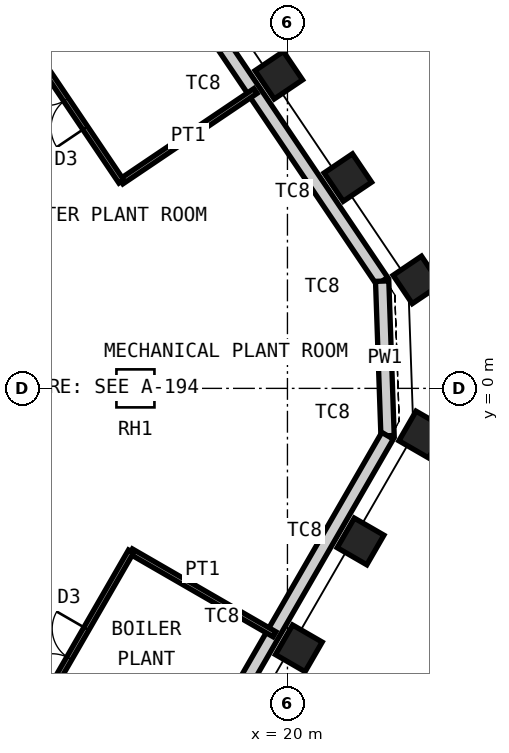
"""IFC4 building model, lengths in metres.
Left out: names, types, materials, properties, quantities, classifications, styles, units other than length and angle.
Written with IfcOpenShell. Run it as: python <this file> out.ifc"""

import sys

from ifc_helpers import new_model, si_unit, direction, frame, frame_2d, origin, origin_2d, place, context, subcontext, project, spatial, rectangle, hollow_rectangle, extrude, element, fill, save


model = new_model("IFC4")
c1 = context("Model", 3, precision=1e-05, world=origin(), true_north=direction((0.0, 1.0)))
c2 = subcontext(c1, "Body", "Model", "MODEL_VIEW")
j1 = project(units=[si_unit("LENGTHUNIT", "METRE"), si_unit("PLANEANGLEUNIT", "RADIAN")], contexts=[c1])
p1 = place(None, origin())
s1 = spatial("IfcSite", under=j1, at=p1, CompositionType="ELEMENT")
p2 = place(p1, origin())
s2 = spatial("IfcBuilding", under=s1, at=p2, CompositionType="ELEMENT")
p3 = place(p2, frame((0.0, 0.0, 343.6)))
s3 = spatial("IfcBuildingStorey", under=s2, at=p3, CompositionType="ELEMENT", Elevation=343.6)
for number, where, z_axis, x_axis in (
    (1, (19.773, 8.239, 0.0), (0.0, 0.0, 1.0), (-0.559, 0.829, 0.0)),
    (2, (21.589, 5.547, 0.0), (0.0, 0.0, 1.0), (-0.559, 0.829, 0.0)),
    (3, (23.406, 2.854, 0.0), (0.0, 0.0, 1.0), (-0.559, 0.829, 0.0)),
    (4, (23.548, -1.214, 0.0), (0.0, 0.0, 1.0), (0.5, 0.866, 0.0)),
    (5, (21.924, -4.027, 0.0), (0.0, 0.0, 1.0), (0.5, 0.866, 0.0)),
    (6, (20.3, -6.84, 0.0), (0.0, 0.0, 1.0), (0.5, 0.866, 0.0)),
):
    element("IfcColumn", number, at=place(p3, frame(where, z_axis=z_axis, x_axis=x_axis)), inside=s3, PredefinedType="COLUMN", context=c2, shape_type="SweptSolid", body=[
        extrude(hollow_rectangle(XDim=0.9, YDim=0.9, WallThickness=0.05, at=origin_2d()), origin(), (0.0, 0.0, 1.0), 4.65),
    ])
p4 = place(p3, frame((12.096, 18.235, 5.0), z_axis=(0.0, 0.0, 1.0), x_axis=(0.559186168722, -0.829042115161, 0.0)))
e7 = element("IfcWall", 7, at=p4, inside=s3, PredefinedType="PARAPET", context=c2, shape_type="SweptSolid", body=[
    extrude(rectangle(XDim=18.592, YDim=0.35, at=frame_2d((9.296, 0.0))), origin(), (0.0, 0.0, 1.0), 1.2),
])
p5 = place(p3, frame((22.492, 2.822, 5.0), z_axis=(0.0, 0.0, 1.0), x_axis=(0.03490639867, -0.999390585973, 0.0)))
e8 = element("IfcWall", 8, at=p5, inside=s3, PredefinedType="PARAPET", context=c2, shape_type="SweptSolid", body=[
    extrude(rectangle(XDim=4.071, YDim=0.35, at=frame_2d((2.035, 0.0))), origin(), (0.0, 0.0, 1.0), 1.2),
])
p6 = place(p3, frame((22.634, -1.246, 5.0), z_axis=(0.0, 0.0, 1.0), x_axis=(-0.499997535337, -0.866026826754, 0.0)))
e9 = element("IfcWall", 9, at=p6, inside=s3, PredefinedType="PARAPET", context=c2, shape_type="SweptSolid", body=[
    extrude(rectangle(XDim=18.592, YDim=0.35, at=frame_2d((9.296, 0.0))), origin(), (0.0, 0.0, 1.0), 1.2),
])
p7 = place(p3, frame((19.16, 7.826, 0.0), z_axis=(0.0, 0.0, 1.0), x_axis=(-0.829022699791, -0.559214952617, 0.0)))
e10 = element("IfcWall", 10, at=p7, inside=s3, PredefinedType="PARTITIONING", context=c2, shape_type="SweptSolid", body=[
    extrude(rectangle(XDim=4.26, YDim=0.15, at=frame_2d((2.13, 0.0))), origin(), (0.0, 0.0, 1.0), 4.65),
])
p8 = place(p3, frame((11.995, 10.829, 0.0), z_axis=(0.0, 0.0, 1.0), x_axis=(0.559193332958, -0.829037282862, 0.0)))
e11 = element("IfcWall", 11, at=p8, inside=s3, PredefinedType="PARTITIONING", context=c2, shape_type="SweptSolid", body=[
    extrude(rectangle(XDim=6.496, YDim=0.15, at=frame_2d((3.248, 0.0))), origin(), (0.0, 0.0, 1.0), 4.65),
])
p9 = place(p8, frame((2.998, 0.0, 0.0)))
e12 = element("IfcOpeningElement", 12, at=p9, cuts=e11, PredefinedType="OPENING", context=c2, shape_type="SweptSolid", body=[
    extrude(rectangle(XDim=1.8, YDim=2.4, at=frame_2d((0.9, 1.2))), frame((0.0, 0.085, 0.0), z_axis=(0.0, -1.0, 0.0), x_axis=(1.0, 0.0, 0.0)), (0.0, 0.0, 1.0), 0.17),
])
p10 = place(p3, frame((19.659, -6.47, 0.0), z_axis=(0.0, 0.0, 1.0), x_axis=(-0.866032659912, 0.499987431809, 0.0)))
e13 = element("IfcWall", 13, at=p10, inside=s3, PredefinedType="PARTITIONING", context=c2, shape_type="SweptSolid", body=[
    extrude(rectangle(XDim=4.36, YDim=0.15, at=frame_2d((2.18, 0.0))), origin(), (0.0, 0.0, 1.0), 4.65),
])
p11 = place(p3, frame((15.883, -4.29, 0.0), z_axis=(0.0, 0.0, 1.0), x_axis=(-0.500003318956, -0.866023487576, 0.0)))
e14 = element("IfcWall", 14, at=p11, inside=s3, PredefinedType="PARTITIONING", context=c2, shape_type="SweptSolid", body=[
    extrude(rectangle(XDim=6.496, YDim=0.15, at=frame_2d((3.248, 0.0))), origin(), (0.0, 0.0, 1.0), 4.65),
])
p12 = place(p11, frame((2.348, 0.0, 0.0)))
e15 = element("IfcOpeningElement", 15, at=p12, cuts=e14, PredefinedType="OPENING", context=c2, shape_type="SweptSolid", body=[
    extrude(rectangle(XDim=1.8, YDim=2.4, at=frame_2d((0.9, 1.2))), frame((0.0, 0.085, 0.0), z_axis=(0.0, -1.0, 0.0), x_axis=(1.0, 0.0, 0.0)), (0.0, 0.0, 1.0), 0.17),
])
p13 = place(p2, frame((0.0, 0.0, 348.6)))
p14 = place(p13, frame((0.0, 0.0, -0.35)))
p15 = place(p14, frame((16.0, 0.0, 0.0)))
p16 = place(p15, frame((0.0, 0.0, 0.3)))
e16 = element("IfcWindow", 16, at=p16, inside=s3, PartitioningType="SINGLE_PANEL", PredefinedType="SKYLIGHT", context=c2, shape_type="SweptSolid", body=[
    extrude(rectangle(XDim=1.0, YDim=1.0, at=origin_2d()), origin(), (0.0, 0.0, 1.0), 0.05),
])
p17 = place(p9, origin())
e17 = element("IfcDoor", 17, at=p17, inside=s3, OperationType="DOUBLE_DOOR_DOUBLE_SWING", PredefinedType="DOOR", context=c2, shape_type="SweptSolid", body=[
    extrude(rectangle(XDim=1.8, YDim=2.4, at=frame_2d((0.9, 1.2))), frame((0.0, 0.025, 0.0), z_axis=(0.0, -1.0, 0.0), x_axis=(1.0, 0.0, 0.0)), (0.0, 0.0, 1.0), 0.05),
])
fill(e12, e17)
p18 = place(p12, origin())
e18 = element("IfcDoor", 18, at=p18, inside=s3, OperationType="DOUBLE_DOOR_DOUBLE_SWING", PredefinedType="DOOR", context=c2, shape_type="SweptSolid", body=[
    extrude(rectangle(XDim=1.8, YDim=2.4, at=frame_2d((0.9, 1.2))), frame((0.0, 0.025, 0.0), z_axis=(0.0, -1.0, 0.0), x_axis=(1.0, 0.0, 0.0)), (0.0, 0.0, 1.0), 0.05),
])
fill(e15, e18)
save(model, sys.argv[1])
